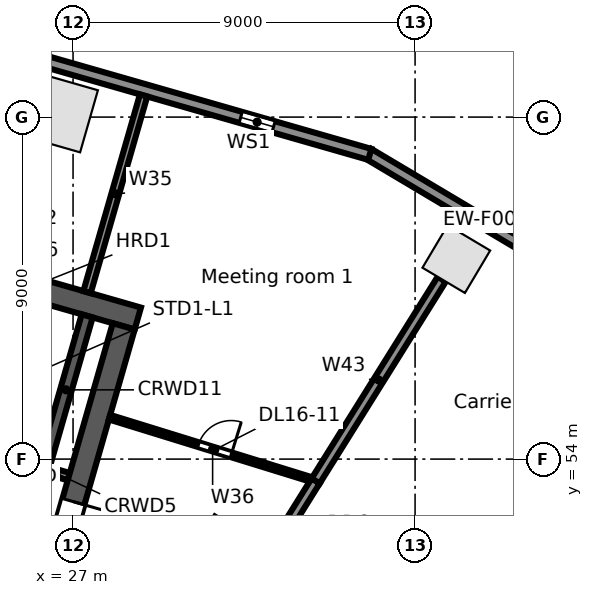
"""IFC4 building model, lengths in metres.
Left out: names, types, materials, properties, quantities, classifications, styles, units other than length and angle.
Written with IfcOpenShell. Run it as: python <this file> out.ifc"""

import sys

from ifc_helpers import new_model, si_unit, direction, frame, frame_2d, origin, origin_2d, place, context, subcontext, project, spatial, rectangle, extrude, element, fill, save


model = new_model("IFC4")
c1 = context("Model", 3, precision=1e-05, world=origin(), true_north=direction((0.0, 1.0)))
c2 = subcontext(c1, "Body", "Model", "MODEL_VIEW")
j1 = project(units=[si_unit("LENGTHUNIT", "METRE"), si_unit("PLANEANGLEUNIT", "RADIAN")], contexts=[c1])
p1 = place(None, origin())
s1 = spatial("IfcSite", under=j1, at=p1, CompositionType="ELEMENT")
p2 = place(p1, origin())
s2 = spatial("IfcBuilding", under=s1, at=p2, CompositionType="ELEMENT")
p3 = place(p2, frame((0.0, 0.0, 86.5)))
s3 = spatial("IfcBuildingStorey", under=s2, at=p3, CompositionType="ELEMENT", Elevation=86.5)
p4 = place(p3, frame((37.085, 59.262, 0.0), z_axis=(0.0, 0.0, 1.0), x_axis=(-0.859406411501, 0.511293086077, 0.0)))
e1 = element("IfcColumn", 1, at=p4, inside=s3, PredefinedType="COLUMN", context=c2, shape_type="SweptSolid", body=[
    extrude(rectangle(XDim=1.3, YDim=1.3, at=origin_2d()), origin(), (0.0, 0.0, 1.0), 5.0),
])
for number, where, z_axis, x_axis in (
    (2, (26.603, 63.124, 0.0), (0.0, 0.0, 1.0), (-0.961, 0.276, 0.0)),
    (3, (30.99, 51.386, 0.0), (0.0, 0.0, 1.0), (0.53, 0.848, 0.0)),
):
    element("IfcColumn", number, at=place(p3, frame(where, z_axis=z_axis, x_axis=x_axis)), inside=s3, PredefinedType="COLUMN", context=c2, shape_type="SweptSolid", body=[
        extrude(rectangle(XDim=1.7, YDim=1.7, at=origin_2d()), origin(), (0.0, 0.0, 1.0), 5.0),
    ])
p5 = place(p3, frame((34.773, 62.034, 0.0), z_axis=(0.0, 0.0, 1.0), x_axis=(0.859401317772, -0.511301647769, 0.0)))
e4 = element("IfcWall", 4, at=p5, inside=s3, PredefinedType="STANDARD", context=c2, shape_type="SweptSolid", body=[
    extrude(rectangle(XDim=6.808, YDim=0.3, at=frame_2d((3.404, 0.0))), origin(), (0.0, 0.0, 1.0), 4.65),
])
p6 = place(p3, frame((3.335, 71.044, 0.0), z_axis=(0.0, 0.0, 1.0), x_axis=(0.961260130989, -0.275642813387, 0.0)))
e5 = element("IfcWall", 5, at=p6, inside=s3, PredefinedType="STANDARD", context=c2, shape_type="SweptSolid", body=[
    extrude(rectangle(XDim=32.741, YDim=0.3, at=frame_2d((16.371, 0.0))), origin(), (0.0, 0.0, 1.0), 4.65),
])
p7 = place(p6, frame((29.207, 0.0, 0.6)))
e6 = element("IfcOpeningElement", 6, at=p7, cuts=e5, PredefinedType="OPENING", context=c2, shape_type="SweptSolid", body=[
    extrude(rectangle(XDim=0.9, YDim=3.2, at=frame_2d((0.45, 1.6))), frame((0.0, 0.16, 0.0), z_axis=(0.0, -1.0, 0.0), x_axis=(1.0, 0.0, 0.0)), (0.0, 0.0, 1.0), 0.32),
])
p8 = place(p6, frame((21.034, 0.0, 0.6)))
e7 = element("IfcOpeningElement", 7, at=p8, cuts=e5, PredefinedType="OPENING", context=c2, shape_type="SweptSolid", body=[
    extrude(rectangle(XDim=0.9, YDim=3.2, at=frame_2d((0.45, 1.6))), frame((0.0, 0.16, 0.0), z_axis=(0.0, -1.0, 0.0), x_axis=(1.0, 0.0, 0.0)), (0.0, 0.0, 1.0), 0.32),
])
p9 = place(p6, frame((12.861, 0.0, 0.6)))
e8 = element("IfcOpeningElement", 8, at=p9, cuts=e5, PredefinedType="OPENING", context=c2, shape_type="SweptSolid", body=[
    extrude(rectangle(XDim=0.9, YDim=3.2, at=frame_2d((0.45, 1.6))), frame((0.0, 0.16, 0.0), z_axis=(0.0, -1.0, 0.0), x_axis=(1.0, 0.0, 0.0)), (0.0, 0.0, 1.0), 0.32),
])
p10 = place(p6, frame((4.688, 0.0, 0.6)))
e9 = element("IfcOpeningElement", 9, at=p10, cuts=e5, PredefinedType="OPENING", context=c2, shape_type="SweptSolid", body=[
    extrude(rectangle(XDim=0.9, YDim=3.2, at=frame_2d((0.45, 1.6))), frame((0.0, 0.16, 0.0), z_axis=(0.0, -1.0, 0.0), x_axis=(1.0, 0.0, 0.0)), (0.0, 0.0, 1.0), 0.32),
])
p11 = place(p3, frame((26.214, 53.732, 0.0), z_axis=(0.0, 0.0, 1.0), x_axis=(0.96122076476, -0.27578005982, 0.0)))
e10 = element("IfcWall", 10, at=p11, inside=s3, PredefinedType="SOLIDWALL", context=c2, shape_type="SweptSolid", body=[
    extrude(rectangle(XDim=0.7, YDim=0.2, at=frame_2d((0.35, 0.0))), origin(), (0.0, 0.0, 1.0), 4.65),
])
p12 = place(p3, frame((20.053, 60.18, 0.0), z_axis=(0.0, 0.0, 1.0), x_axis=(0.96126248289, -0.275634611374, 0.0)))
e11 = element("IfcWall", 11, at=p12, inside=s3, PredefinedType="SOLIDWALL", context=c2, shape_type="SweptSolid", body=[
    extrude(rectangle(XDim=9.0, YDim=0.6, at=frame_2d((4.5, 0.0))), origin(), (0.0, 0.0, 1.0), 4.65),
])
p13 = place(p3, frame((26.256, 53.876, 0.0), z_axis=(0.0, 0.0, 1.0), x_axis=(0.275612739511, 0.961268754209, 0.0)))
e12 = element("IfcWall", 12, at=p13, inside=s3, PredefinedType="SOLIDWALL", context=c2, shape_type="SweptSolid", body=[
    extrude(rectangle(XDim=4.05, YDim=0.3, at=frame_2d((2.025, 0.0))), origin(), (0.0, 0.0, 1.0), 4.65),
])
p14 = place(p3, frame((25.356, 47.112, 0.0), z_axis=(0.0, 0.0, 1.0), x_axis=(0.275631631629, 0.961263337304, 0.0)))
e13 = element("IfcWall", 13, at=p14, inside=s3, PredefinedType="SOLIDWALL", context=c2, shape_type="SweptSolid", body=[
    extrude(rectangle(XDim=10.8, YDim=0.6, at=frame_2d((5.4, 0.0))), origin(), (0.0, 0.0, 1.0), 4.65),
])
p15 = place(p14, frame((4.8, 0.0, 0.0)))
e14 = element("IfcOpeningElement", 14, at=p15, cuts=e13, PredefinedType="OPENING", context=c2, shape_type="SweptSolid", body=[
    extrude(rectangle(XDim=1.2, YDim=2.1, at=frame_2d((0.6, 1.05))), frame((0.0, 0.31, 0.0), z_axis=(0.0, -1.0, 0.0), x_axis=(1.0, 0.0, 0.0)), (0.0, 0.0, 1.0), 0.62),
])
p16 = place(p3, frame((27.368, 58.394, 0.0), z_axis=(0.0, 0.0, 1.0), x_axis=(0.276295387056, 0.961072764722, 0.0)))
e15 = element("IfcWall", 15, at=p16, inside=s3, PredefinedType="PARTITIONING", context=c2, shape_type="SweptSolid", body=[
    extrude(rectangle(XDim=5.386, YDim=0.2, at=frame_2d((2.693, 0.0))), origin(), (0.0, 0.0, 1.0), 3.822),
])
p17 = place(p3, frame((27.96, 55.103, 0.0), z_axis=(0.0, 0.0, 1.0), x_axis=(0.955442775069, -0.29517639399, 0.0)))
e16 = element("IfcWall", 16, at=p17, inside=s3, PredefinedType="PARTITIONING", context=c2, shape_type="SweptSolid", body=[
    extrude(rectangle(XDim=5.678, YDim=0.125, at=frame_2d((2.839, 0.0))), origin(), (0.0, 0.0, 1.0), 3.822),
])
p18 = place(p17, frame((2.45, 0.0, 0.0)))
e17 = element("IfcOpeningElement", 17, at=p18, cuts=e16, PredefinedType="OPENING", context=c2, shape_type="SweptSolid", body=[
    extrude(rectangle(XDim=0.9, YDim=2.1, at=frame_2d((0.45, 1.05))), frame((0.0, 0.073, 0.0), z_axis=(0.0, -1.0, 0.0), x_axis=(1.0, 0.0, 0.0)), (0.0, 0.0, 1.0), 0.145),
])
p19 = place(p3, frame((29.675, 47.491, 0.0), z_axis=(0.0, 0.0, 1.0), x_axis=(0.529992669945, 0.848002222759, 0.0)))
e18 = element("IfcWall", 18, at=p19, inside=s3, PredefinedType="PARTITIONING", context=c2, shape_type="SweptSolid", body=[
    extrude(rectangle(XDim=7.0, YDim=0.25, at=frame_2d((3.5, 0.0))), origin(), (0.0, 0.0, 1.0), 3.73),
])
p20 = place(p3, frame((30.126, 41.882, 0.0), z_axis=(0.0, 0.0, 1.0), x_axis=(0.709029789155, 0.705178529233, 0.0)))
e19 = element("IfcWall", 19, at=p20, inside=s3, PredefinedType="PARTITIONING", context=c2, shape_type="SweptSolid", body=[
    extrude(rectangle(XDim=19.018, YDim=0.125, at=frame_2d((9.509, 0.0))), origin(), (0.0, 0.0, 1.0), 3.73),
])
p21 = place(p3, frame((33.385, 53.427, 0.0), z_axis=(0.0, 0.0, 1.0), x_axis=(0.529897235032, 0.848061861131, 0.0)))
e20 = element("IfcWall", 20, at=p21, inside=s3, PredefinedType="PARTITIONING", context=c2, shape_type="SweptSolid", body=[
    extrude(rectangle(XDim=6.258, YDim=0.25, at=frame_2d((3.129, 0.0))), origin(), (0.0, 0.0, 1.0), 3.73),
])
p22 = place(p7, origin())
e21 = element("IfcWindow", 21, at=p22, inside=s3, PartitioningType="SINGLE_PANEL", PredefinedType="WINDOW", context=c2, shape_type="SweptSolid", body=[
    extrude(rectangle(XDim=0.9, YDim=3.2, at=frame_2d((0.45, 1.6))), frame((0.0, 0.03, 0.0), z_axis=(0.0, -1.0, 0.0), x_axis=(1.0, 0.0, 0.0)), (0.0, 0.0, 1.0), 0.06),
])
fill(e6, e21)
p23 = place(p15, frame((1.2, 0.0, 0.0), z_axis=(0.0, 0.0, 1.0), x_axis=(-1.0, 0.0, 0.0)))
e22 = element("IfcDoor", 22, at=p23, inside=s3, OperationType="SINGLE_SWING_LEFT", PredefinedType="DOOR", context=c2, shape_type="SweptSolid", body=[
    extrude(rectangle(XDim=1.2, YDim=2.1, at=frame_2d((0.6, 1.05))), frame((0.0, 0.025, 0.0), z_axis=(0.0, -1.0, 0.0), x_axis=(1.0, 0.0, 0.0)), (0.0, 0.0, 1.0), 0.05),
])
fill(e14, e22)
p24 = place(p18, origin())
e23 = element("IfcDoor", 23, at=p24, inside=s3, OperationType="SINGLE_SWING_RIGHT", PredefinedType="DOOR", context=c2, shape_type="SweptSolid", body=[
    extrude(rectangle(XDim=0.9, YDim=2.1, at=frame_2d((0.45, 1.05))), frame((0.0, 0.025, 0.0), z_axis=(0.0, -1.0, 0.0), x_axis=(1.0, 0.0, 0.0)), (0.0, 0.0, 1.0), 0.05),
])
fill(e17, e23)
save(model, sys.argv[1])
